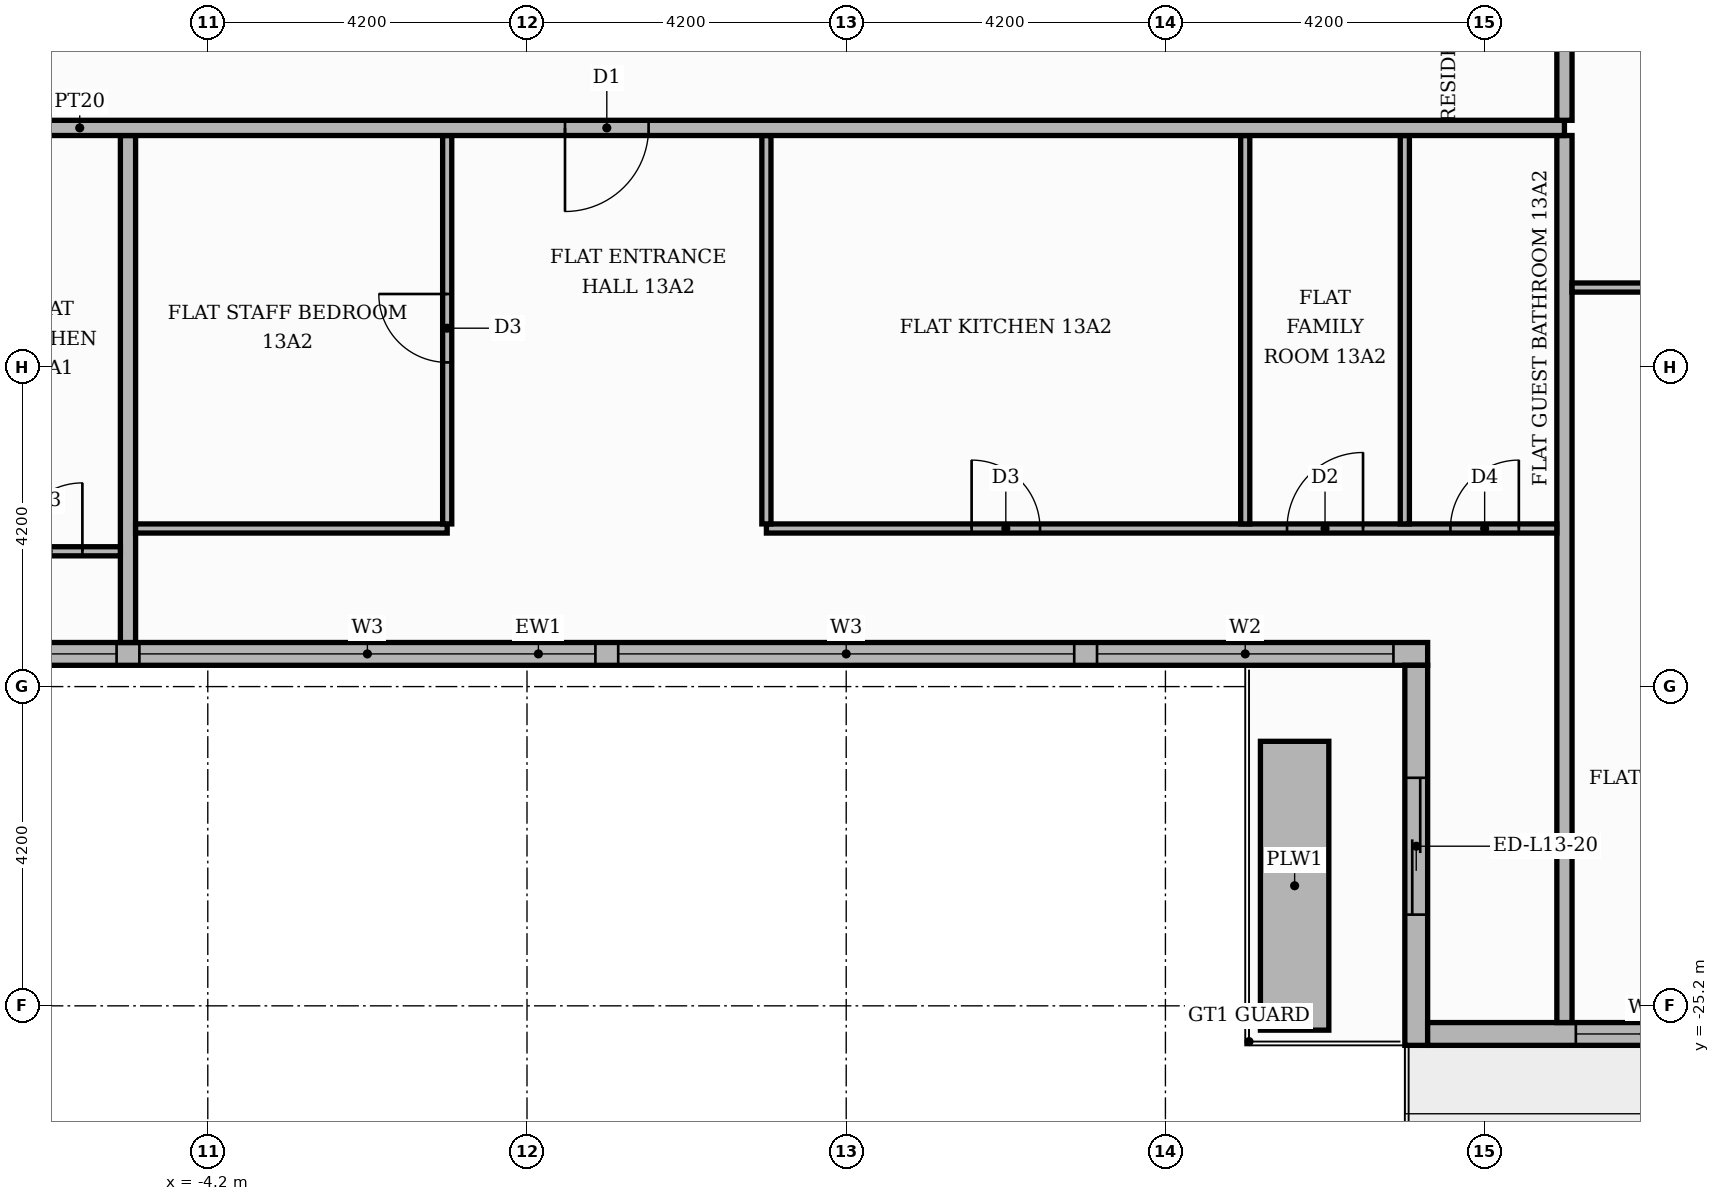
"""IFC4 building model, lengths in metres.
Left out: names, types, materials, properties, quantities, classifications, styles, units other than length and angle.
Written with IfcOpenShell. Run it as: python <this file> out.ifc"""

import sys

from ifc_helpers import new_model, si_unit, direction, frame, frame_2d, origin, place, context, subcontext, project, spatial, rectangle, extrude, element, fill, save


model = new_model("IFC4")
c1 = context("Model", 3, precision=1e-05, world=origin(), true_north=direction((0.0, 1.0)))
c2 = subcontext(c1, "Body", "Model", "MODEL_VIEW")
j1 = project(units=[si_unit("LENGTHUNIT", "METRE"), si_unit("PLANEANGLEUNIT", "RADIAN")], contexts=[c1])
p1 = place(None, origin())
s1 = spatial("IfcSite", under=j1, at=p1, CompositionType="ELEMENT")
p2 = place(p1, origin())
s2 = spatial("IfcBuilding", under=s1, at=p2, CompositionType="ELEMENT")
p3 = place(p2, frame((0.0, 0.0, 58.2)))
s3 = spatial("IfcBuildingStorey", under=s2, at=p3, CompositionType="ELEMENT", Elevation=58.2)
p4 = place(p3, frame((-11.55, -20.57, 0.0), z_axis=(0.0, 0.0, 1.0), x_axis=(1.0, 0.0, 0.0)))
e1 = element("IfcWall", 1, at=p4, inside=s3, PredefinedType="STANDARD", context=c2, shape_type="SweptSolid", body=[
    extrude(rectangle(XDim=23.4, YDim=0.3, at=frame_2d((11.7, 0.0))), origin(), (0.0, 0.0, 1.0), 3.48),
])
p5 = place(p4, frame((0.15, 0.0, 0.9)))
e2 = element("IfcOpeningElement", 2, at=p5, cuts=e1, PredefinedType="OPENING", context=c2, shape_type="SweptSolid", body=[
    extrude(rectangle(XDim=6.0, YDim=2.1, at=frame_2d((3.0, 1.05))), frame((0.0, 0.16, 0.0), z_axis=(0.0, -1.0, 0.0), x_axis=(1.0, 0.0, 0.0)), (0.0, 0.0, 1.0), 0.32),
])
p6 = place(p4, frame((6.45, 0.0, 0.9)))
e3 = element("IfcOpeningElement", 3, at=p6, cuts=e1, PredefinedType="OPENING", context=c2, shape_type="SweptSolid", body=[
    extrude(rectangle(XDim=6.0, YDim=2.1, at=frame_2d((3.0, 1.05))), frame((0.0, 0.16, 0.0), z_axis=(0.0, -1.0, 0.0), x_axis=(1.0, 0.0, 0.0)), (0.0, 0.0, 1.0), 0.32),
])
p7 = place(p4, frame((12.75, 0.0, 0.9)))
e4 = element("IfcOpeningElement", 4, at=p7, cuts=e1, PredefinedType="OPENING", context=c2, shape_type="SweptSolid", body=[
    extrude(rectangle(XDim=6.0, YDim=2.1, at=frame_2d((3.0, 1.05))), frame((0.0, 0.16, 0.0), z_axis=(0.0, -1.0, 0.0), x_axis=(1.0, 0.0, 0.0)), (0.0, 0.0, 1.0), 0.32),
])
p8 = place(p4, frame((19.05, 0.0, 0.9)))
e5 = element("IfcOpeningElement", 5, at=p8, cuts=e1, PredefinedType="OPENING", context=c2, shape_type="SweptSolid", body=[
    extrude(rectangle(XDim=3.9, YDim=2.1, at=frame_2d((1.95, 1.05))), frame((0.0, 0.16, 0.0), z_axis=(0.0, -1.0, 0.0), x_axis=(1.0, 0.0, 0.0)), (0.0, 0.0, 1.0), 0.32),
])
p9 = place(p3, frame((11.7, -20.72, 0.0), z_axis=(0.0, 0.0, 1.0), x_axis=(0.0, -1.0, 0.0)))
e6 = element("IfcWall", 6, at=p9, inside=s3, PredefinedType="STANDARD", context=c2, shape_type="SweptSolid", body=[
    extrude(rectangle(XDim=5.0, YDim=0.3, at=frame_2d((2.5, 0.0))), origin(), (0.0, 0.0, 1.0), 3.48),
])
p10 = place(p9, frame((1.48, 0.0, 0.0)))
e7 = element("IfcOpeningElement", 7, at=p10, cuts=e6, PredefinedType="OPENING", context=c2, shape_type="SweptSolid", body=[
    extrude(rectangle(XDim=1.8, YDim=2.4, at=frame_2d((0.9, 1.2))), frame((0.0, 0.16, 0.0), z_axis=(0.0, -1.0, 0.0), x_axis=(1.0, 0.0, 0.0)), (0.0, 0.0, 1.0), 0.32),
])
p11 = place(p3, frame((11.85, -25.57, 0.0), z_axis=(0.0, 0.0, 1.0), x_axis=(1.0, 0.0, 0.0)))
e8 = element("IfcWall", 8, at=p11, inside=s3, PredefinedType="STANDARD", context=c2, shape_type="SweptSolid", body=[
    extrude(rectangle(XDim=4.35, YDim=0.3, at=frame_2d((2.175, 0.0))), origin(), (0.0, 0.0, 1.0), 3.48),
])
p12 = place(p11, frame((1.95, 0.0, 0.9)))
e9 = element("IfcOpeningElement", 9, at=p12, cuts=e8, PredefinedType="OPENING", context=c2, shape_type="SweptSolid", body=[
    extrude(rectangle(XDim=1.8, YDim=2.1, at=frame_2d((0.9, 1.05))), frame((0.0, 0.16, 0.0), z_axis=(0.0, -1.0, 0.0), x_axis=(1.0, 0.0, 0.0)), (0.0, 0.0, 1.0), 0.32),
])
p13 = place(p3, frame((10.1, -25.52, 0.0), z_axis=(0.0, 0.0, 1.0), x_axis=(0.0, 1.0, 0.0)))
e10 = element("IfcWall", 10, at=p13, inside=s3, PredefinedType="MOVABLE", context=c2, shape_type="SweptSolid", body=[
    extrude(rectangle(XDim=3.8, YDim=0.9, at=frame_2d((1.9, 0.0))), origin(), (0.0, 0.0, 1.0), 0.6),
])
p14 = place(p3, frame((13.65, -25.42, 0.0), z_axis=(0.0, 0.0, 1.0), x_axis=(0.0, 1.0, 0.0)))
e11 = element("IfcWall", 11, at=p14, inside=s3, PredefinedType="PARTITIONING", context=c2, shape_type="SweptSolid", body=[
    extrude(rectangle(XDim=11.67, YDim=0.2, at=frame_2d((5.835, 0.0))), origin(), (0.0, 0.0, 1.0), 3.48),
])
p15 = place(p3, frame((-5.25, -20.42, 0.0), z_axis=(0.0, 0.0, 1.0), x_axis=(0.0, 1.0, 0.0)))
e12 = element("IfcWall", 12, at=p15, inside=s3, PredefinedType="PARTITIONING", context=c2, shape_type="SweptSolid", body=[
    extrude(rectangle(XDim=6.67, YDim=0.2, at=frame_2d((3.335, 0.0))), origin(), (0.0, 0.0, 1.0), 3.48),
])
p16 = place(p3, frame((-9.45, -19.22, 0.0), z_axis=(0.0, 0.0, 1.0), x_axis=(1.0, 0.0, 0.0)))
e13 = element("IfcWall", 13, at=p16, inside=s3, PredefinedType="PARTITIONING", context=c2, shape_type="SweptSolid", body=[
    extrude(rectangle(XDim=4.1, YDim=0.12, at=frame_2d((2.05, 0.0))), origin(), (0.0, 0.0, 1.0), 3.48),
])
p17 = place(p16, frame((2.7, 0.0, 0.0)))
e14 = element("IfcOpeningElement", 14, at=p17, cuts=e13, PredefinedType="OPENING", context=c2, shape_type="SweptSolid", body=[
    extrude(rectangle(XDim=0.9, YDim=2.1, at=frame_2d((0.45, 1.05))), frame((0.0, 0.07, 0.0), z_axis=(0.0, -1.0, 0.0), x_axis=(1.0, 0.0, 0.0)), (0.0, 0.0, 1.0), 0.14),
])
p18 = place(p3, frame((-5.15, -18.92, 0.0), z_axis=(0.0, 0.0, 1.0), x_axis=(1.0, 0.0, 0.0)))
e15 = element("IfcWall", 15, at=p18, inside=s3, PredefinedType="PARTITIONING", context=c2, shape_type="SweptSolid", body=[
    extrude(rectangle(XDim=4.1, YDim=0.12, at=frame_2d((2.05, 0.0))), origin(), (0.0, 0.0, 1.0), 3.48),
])
p19 = place(p3, frame((3.15, -18.92, 0.0), z_axis=(0.0, 0.0, 1.0), x_axis=(1.0, 0.0, 0.0)))
e16 = element("IfcWall", 16, at=p19, inside=s3, PredefinedType="PARTITIONING", context=c2, shape_type="SweptSolid", body=[
    extrude(rectangle(XDim=10.4, YDim=0.12, at=frame_2d((5.2, 0.0))), origin(), (0.0, 0.0, 1.0), 3.48),
])
p20 = place(p19, frame((2.7, 0.0, 0.0)))
e17 = element("IfcOpeningElement", 17, at=p20, cuts=e16, PredefinedType="OPENING", context=c2, shape_type="SweptSolid", body=[
    extrude(rectangle(XDim=0.9, YDim=2.1, at=frame_2d((0.45, 1.05))), frame((0.0, 0.07, 0.0), z_axis=(0.0, -1.0, 0.0), x_axis=(1.0, 0.0, 0.0)), (0.0, 0.0, 1.0), 0.14),
])
p21 = place(p19, frame((6.85, 0.0, 0.0)))
e18 = element("IfcOpeningElement", 18, at=p21, cuts=e16, PredefinedType="OPENING", context=c2, shape_type="SweptSolid", body=[
    extrude(rectangle(XDim=1.0, YDim=2.1, at=frame_2d((0.5, 1.05))), frame((0.0, 0.07, 0.0), z_axis=(0.0, -1.0, 0.0), x_axis=(1.0, 0.0, 0.0)), (0.0, 0.0, 1.0), 0.14),
])
p22 = place(p19, frame((9.0, 0.0, 0.0)))
e19 = element("IfcOpeningElement", 19, at=p22, cuts=e16, PredefinedType="OPENING", context=c2, shape_type="SweptSolid", body=[
    extrude(rectangle(XDim=0.9, YDim=2.1, at=frame_2d((0.45, 1.05))), frame((0.0, 0.07, 0.0), z_axis=(0.0, -1.0, 0.0), x_axis=(1.0, 0.0, 0.0)), (0.0, 0.0, 1.0), 0.14),
])
p23 = place(p3, frame((-1.05, -18.86, 0.0), z_axis=(0.0, 0.0, 1.0), x_axis=(0.0, 1.0, 0.0)))
e20 = element("IfcWall", 20, at=p23, inside=s3, PredefinedType="PARTITIONING", context=c2, shape_type="SweptSolid", body=[
    extrude(rectangle(XDim=5.11, YDim=0.12, at=frame_2d((2.555, 0.0))), origin(), (0.0, 0.0, 1.0), 3.48),
])
p24 = place(p23, frame((2.125, 0.0, 0.0)))
e21 = element("IfcOpeningElement", 21, at=p24, cuts=e20, PredefinedType="OPENING", context=c2, shape_type="SweptSolid", body=[
    extrude(rectangle(XDim=0.9, YDim=2.1, at=frame_2d((0.45, 1.05))), frame((0.0, 0.07, 0.0), z_axis=(0.0, -1.0, 0.0), x_axis=(1.0, 0.0, 0.0)), (0.0, 0.0, 1.0), 0.14),
])
for number, where, z_axis, x_axis in (
    (22, (3.15, -18.86, 0.0), (0.0, 0.0, 1.0), (0.0, 1.0, 0.0)),
    (23, (9.45, -18.86, 0.0), (0.0, 0.0, 1.0), (0.0, 1.0, 0.0)),
    (24, (11.55, -18.86, 0.0), (0.0, 0.0, 1.0), (0.0, 1.0, 0.0)),
):
    element("IfcWall", number, at=place(p3, frame(where, z_axis=z_axis, x_axis=x_axis)), inside=s3, PredefinedType="PARTITIONING", context=c2, shape_type="SweptSolid", body=[
        extrude(rectangle(XDim=5.11, YDim=0.12, at=frame_2d((2.555, 0.0))), origin(), (0.0, 0.0, 1.0), 3.48),
    ])
p25 = place(p3, frame((13.75, -15.75, 0.0), z_axis=(0.0, 0.0, 1.0), x_axis=(1.0, 0.0, 0.0)))
e25 = element("IfcWall", 25, at=p25, inside=s3, PredefinedType="PARTITIONING", context=c2, shape_type="SweptSolid", body=[
    extrude(rectangle(XDim=6.67, YDim=0.12, at=frame_2d((3.335, 0.0))), origin(), (0.0, 0.0, 1.0), 3.48),
])
p26 = place(p25, frame((2.785, 0.0, 0.0)))
e26 = element("IfcOpeningElement", 26, at=p26, cuts=e25, PredefinedType="OPENING", context=c2, shape_type="SweptSolid", body=[
    extrude(rectangle(XDim=1.0, YDim=2.1, at=frame_2d((0.5, 1.05))), frame((0.0, 0.07, 0.0), z_axis=(0.0, -1.0, 0.0), x_axis=(1.0, 0.0, 0.0)), (0.0, 0.0, 1.0), 0.14),
])
p27 = place(p3, frame((-25.42, -13.65, 0.0), z_axis=(0.0, 0.0, 1.0), x_axis=(1.0, 0.0, 0.0)))
e27 = element("IfcWall", 27, at=p27, inside=s3, PredefinedType="PARTITIONING", context=c2, shape_type="SweptSolid", body=[
    extrude(rectangle(XDim=39.07, YDim=0.2, at=frame_2d((19.535, 0.0))), origin(), (0.0, 0.0, 1.0), 3.48),
])
p28 = place(p27, frame((13.32, 0.0, 0.0)))
e28 = element("IfcOpeningElement", 28, at=p28, cuts=e27, PredefinedType="OPENING", context=c2, shape_type="SweptSolid", body=[
    extrude(rectangle(XDim=1.1, YDim=2.4, at=frame_2d((0.55, 1.2))), frame((0.0, 0.11, 0.0), z_axis=(0.0, -1.0, 0.0), x_axis=(1.0, 0.0, 0.0)), (0.0, 0.0, 1.0), 0.22),
])
p29 = place(p27, frame((25.92, 0.0, 0.0)))
e29 = element("IfcOpeningElement", 29, at=p29, cuts=e27, PredefinedType="OPENING", context=c2, shape_type="SweptSolid", body=[
    extrude(rectangle(XDim=1.1, YDim=2.4, at=frame_2d((0.55, 1.2))), frame((0.0, 0.11, 0.0), z_axis=(0.0, -1.0, 0.0), x_axis=(1.0, 0.0, 0.0)), (0.0, 0.0, 1.0), 0.22),
])
p30 = place(p3, frame((13.65, -13.55, 0.0), z_axis=(0.0, 0.0, 1.0), x_axis=(0.0, 1.0, 0.0)))
e30 = element("IfcWall", 30, at=p30, inside=s3, PredefinedType="PARTITIONING", context=c2, shape_type="SweptSolid", body=[
    extrude(rectangle(XDim=27.1, YDim=0.2, at=frame_2d((13.55, 0.0))), origin(), (0.0, 0.0, 1.0), 3.48),
])
p31 = place(p30, frame((1.45, 0.0, 0.0)))
e31 = element("IfcOpeningElement", 31, at=p31, cuts=e30, PredefinedType="OPENING", context=c2, shape_type="SweptSolid", body=[
    extrude(rectangle(XDim=1.1, YDim=2.4, at=frame_2d((0.55, 1.2))), frame((0.0, 0.11, 0.0), z_axis=(0.0, -1.0, 0.0), x_axis=(1.0, 0.0, 0.0)), (0.0, 0.0, 1.0), 0.22),
])
p32 = place(p5, origin())
e32 = element("IfcWindow", 32, at=p32, inside=s3, PartitioningType="SINGLE_PANEL", PredefinedType="WINDOW", context=c2, shape_type="SweptSolid", body=[
    extrude(rectangle(XDim=6.0, YDim=2.1, at=frame_2d((3.0, 1.05))), frame((0.0, 0.03, 0.0), z_axis=(0.0, -1.0, 0.0), x_axis=(1.0, 0.0, 0.0)), (0.0, 0.0, 1.0), 0.06),
])
fill(e2, e32)
p33 = place(p6, origin())
e33 = element("IfcWindow", 33, at=p33, inside=s3, PartitioningType="SINGLE_PANEL", PredefinedType="WINDOW", context=c2, shape_type="SweptSolid", body=[
    extrude(rectangle(XDim=6.0, YDim=2.1, at=frame_2d((3.0, 1.05))), frame((0.0, 0.03, 0.0), z_axis=(0.0, -1.0, 0.0), x_axis=(1.0, 0.0, 0.0)), (0.0, 0.0, 1.0), 0.06),
])
fill(e3, e33)
p34 = place(p7, origin())
e34 = element("IfcWindow", 34, at=p34, inside=s3, PartitioningType="SINGLE_PANEL", PredefinedType="WINDOW", context=c2, shape_type="SweptSolid", body=[
    extrude(rectangle(XDim=6.0, YDim=2.1, at=frame_2d((3.0, 1.05))), frame((0.0, 0.03, 0.0), z_axis=(0.0, -1.0, 0.0), x_axis=(1.0, 0.0, 0.0)), (0.0, 0.0, 1.0), 0.06),
])
fill(e4, e34)
p35 = place(p8, origin())
e35 = element("IfcWindow", 35, at=p35, inside=s3, PartitioningType="SINGLE_PANEL", PredefinedType="WINDOW", context=c2, shape_type="SweptSolid", body=[
    extrude(rectangle(XDim=3.9, YDim=2.1, at=frame_2d((1.95, 1.05))), frame((0.0, 0.03, 0.0), z_axis=(0.0, -1.0, 0.0), x_axis=(1.0, 0.0, 0.0)), (0.0, 0.0, 1.0), 0.06),
])
fill(e5, e35)
p36 = place(p10, origin())
e36 = element("IfcDoor", 36, at=p36, inside=s3, OperationType="SLIDING_TO_RIGHT", PredefinedType="DOOR", context=c2, shape_type="SweptSolid", body=[
    extrude(rectangle(XDim=1.8, YDim=2.4, at=frame_2d((0.9, 1.2))), frame((0.0, 0.025, 0.0), z_axis=(0.0, -1.0, 0.0), x_axis=(1.0, 0.0, 0.0)), (0.0, 0.0, 1.0), 0.05),
])
fill(e7, e36)
p37 = place(p12, origin())
e37 = element("IfcWindow", 37, at=p37, inside=s3, PartitioningType="SINGLE_PANEL", PredefinedType="WINDOW", context=c2, shape_type="SweptSolid", body=[
    extrude(rectangle(XDim=1.8, YDim=2.1, at=frame_2d((0.9, 1.05))), frame((0.0, 0.03, 0.0), z_axis=(0.0, -1.0, 0.0), x_axis=(1.0, 0.0, 0.0)), (0.0, 0.0, 1.0), 0.06),
])
fill(e9, e37)
p38 = place(p17, origin())
e38 = element("IfcDoor", 38, at=p38, inside=s3, OperationType="SINGLE_SWING_RIGHT", PredefinedType="DOOR", context=c2, shape_type="SweptSolid", body=[
    extrude(rectangle(XDim=0.9, YDim=2.1, at=frame_2d((0.45, 1.05))), frame((0.0, 0.025, 0.0), z_axis=(0.0, -1.0, 0.0), x_axis=(1.0, 0.0, 0.0)), (0.0, 0.0, 1.0), 0.05),
])
fill(e14, e38)
p39 = place(p29, frame((1.1, 0.0, 0.0), z_axis=(0.0, 0.0, 1.0), x_axis=(-1.0, 0.0, 0.0)))
e39 = element("IfcDoor", 39, at=p39, inside=s3, OperationType="SINGLE_SWING_LEFT", PredefinedType="DOOR", context=c2, shape_type="SweptSolid", body=[
    extrude(rectangle(XDim=1.1, YDim=2.4, at=frame_2d((0.55, 1.2))), frame((0.0, 0.025, 0.0), z_axis=(0.0, -1.0, 0.0), x_axis=(1.0, 0.0, 0.0)), (0.0, 0.0, 1.0), 0.05),
])
fill(e29, e39)
p40 = place(p24, origin())
e40 = element("IfcDoor", 40, at=p40, inside=s3, OperationType="SINGLE_SWING_RIGHT", PredefinedType="DOOR", context=c2, shape_type="SweptSolid", body=[
    extrude(rectangle(XDim=0.9, YDim=2.1, at=frame_2d((0.45, 1.05))), frame((0.0, 0.025, 0.0), z_axis=(0.0, -1.0, 0.0), x_axis=(1.0, 0.0, 0.0)), (0.0, 0.0, 1.0), 0.05),
])
fill(e21, e40)
p41 = place(p20, origin())
e41 = element("IfcDoor", 41, at=p41, inside=s3, OperationType="SINGLE_SWING_LEFT", PredefinedType="DOOR", context=c2, shape_type="SweptSolid", body=[
    extrude(rectangle(XDim=0.9, YDim=2.1, at=frame_2d((0.45, 1.05))), frame((0.0, 0.025, 0.0), z_axis=(0.0, -1.0, 0.0), x_axis=(1.0, 0.0, 0.0)), (0.0, 0.0, 1.0), 0.05),
])
fill(e17, e41)
p42 = place(p21, origin())
e42 = element("IfcDoor", 42, at=p42, inside=s3, OperationType="SINGLE_SWING_RIGHT", PredefinedType="DOOR", context=c2, shape_type="SweptSolid", body=[
    extrude(rectangle(XDim=1.0, YDim=2.1, at=frame_2d((0.5, 1.05))), frame((0.0, 0.025, 0.0), z_axis=(0.0, -1.0, 0.0), x_axis=(1.0, 0.0, 0.0)), (0.0, 0.0, 1.0), 0.05),
])
fill(e18, e42)
p43 = place(p22, origin())
e43 = element("IfcDoor", 43, at=p43, inside=s3, OperationType="SINGLE_SWING_RIGHT", PredefinedType="DOOR", context=c2, shape_type="SweptSolid", body=[
    extrude(rectangle(XDim=0.9, YDim=2.1, at=frame_2d((0.45, 1.05))), frame((0.0, 0.025, 0.0), z_axis=(0.0, -1.0, 0.0), x_axis=(1.0, 0.0, 0.0)), (0.0, 0.0, 1.0), 0.05),
])
fill(e19, e43)
save(model, sys.argv[1])
